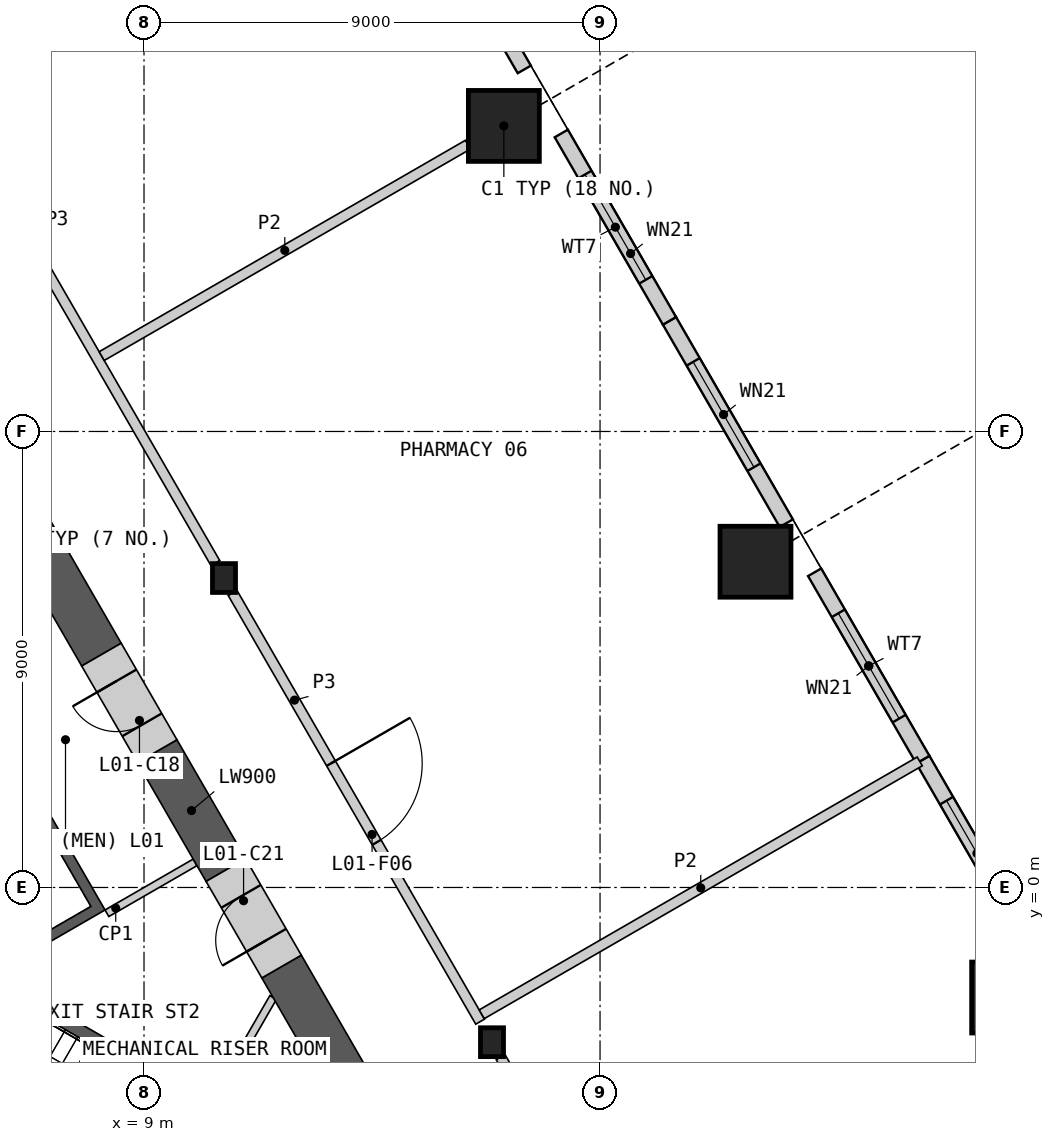
"""IFC4 building model, lengths in metres.
Left out: names, types, materials, properties, quantities, classifications, styles, units other than length and angle.
Written with IfcOpenShell. Run it as: python <this file> out.ifc"""

import sys

from ifc_helpers import new_model, si_unit, direction, frame, frame_2d, origin, origin_2d, place, context, subcontext, project, spatial, polyline, rectangle, hollow_rectangle, i_section, outline, extrude, element, fill, save


model = new_model("IFC4")
c1 = context("Model", 3, precision=1e-05, world=origin(), true_north=direction((0.0, 1.0)))
c2 = subcontext(c1, "Body", "Model", "MODEL_VIEW")
j1 = project(units=[si_unit("LENGTHUNIT", "METRE"), si_unit("PLANEANGLEUNIT", "RADIAN")], contexts=[c1])
p1 = place(None, origin())
s1 = spatial("IfcSite", under=j1, at=p1, CompositionType="ELEMENT")
p2 = place(p1, origin())
s2 = spatial("IfcBuilding", under=s1, at=p2, CompositionType="ELEMENT")
p3 = place(p2, frame((0.0, 0.0, 10.0)))
s3 = spatial("IfcBuildingStorey", under=s2, at=p3, CompositionType="ELEMENT", Elevation=10.0)
for number, where, z_axis, x_axis in (
    (1, (26.034, -2.172, 0.0), (0.0, 0.0, 1.0), (1.0, 0.0, 0.0)),
    (2, (21.068, 6.429, 0.0), (0.0, 0.0, 1.0), (1.0, 0.0, 0.0)),
    (3, (16.102, 15.031, 0.0), (0.0, 0.0, 1.0), (1.0, 0.0, 0.0)),
):
    element("IfcColumn", number, at=place(p3, frame(where, z_axis=z_axis, x_axis=x_axis)), inside=s3, PredefinedType="COLUMN", context=c2, shape_type="SweptSolid", body=[
        extrude(hollow_rectangle(XDim=1.4, YDim=1.4, WallThickness=0.1, at=origin_2d()), origin(), (0.0, 0.0, 1.0), 5.5),
    ])
for number, where, z_axis, x_axis in (
    (4, (15.868, -3.054, 0.0), (0.0, 0.0, 1.0), (1.0, 0.0, 0.0)),
    (5, (10.578, 6.107, 0.0), (0.0, 0.0, 1.0), (1.0, 0.0, 0.0)),
):
    element("IfcColumn", number, at=place(p3, frame(where, z_axis=z_axis, x_axis=x_axis)), inside=s3, PredefinedType="COLUMN", context=c2, shape_type="SweptSolid", body=[
        extrude(i_section(OverallWidth=0.454, OverallDepth=0.57, WebThickness=0.078, FlangeThickness=0.125, at=origin_2d()), origin(), (0.0, 0.0, 1.0), 5.5),
    ])
p4 = place(p3, frame((26.642, -1.412, 0.0), z_axis=(0.0, 0.0, 1.0), x_axis=(-0.499964285679, 0.866046022475, 0.0)))
e6 = element("IfcWall", 6, at=p4, inside=s3, PredefinedType="SOLIDWALL", context=c2, shape_type="SweptSolid", body=[
    extrude(rectangle(XDim=4.544, YDim=0.3, at=frame_2d((2.272, 0.0))), origin(), (0.0, 0.0, 1.0), 5.05),
])
p5 = place(p4, frame((1.209, 0.0, 0.9)))
e7 = element("IfcOpeningElement", 7, at=p5, cuts=e6, PredefinedType="OPENING", context=c2, shape_type="SweptSolid", body=[
    extrude(rectangle(XDim=2.4, YDim=3.0, at=frame_2d((1.2, 1.5))), frame((0.0, 0.16, 0.0), z_axis=(0.0, -1.0, 0.0), x_axis=(1.0, 0.0, 0.0)), (0.0, 0.0, 1.0), 0.32),
])
p6 = place(p3, frame((24.37, 2.523, 0.0), z_axis=(0.0, 0.0, 1.0), x_axis=(-0.500019418418, 0.866014192265, 0.0)))
e8 = element("IfcWall", 8, at=p6, inside=s3, PredefinedType="SOLIDWALL", context=c2, shape_type="SweptSolid", body=[
    extrude(rectangle(XDim=4.27, YDim=0.3, at=frame_2d((2.135, 0.0))), origin(), (0.0, 0.0, 1.0), 5.05),
])
p7 = place(p6, frame((0.935, 0.0, 0.9)))
e9 = element("IfcOpeningElement", 9, at=p7, cuts=e8, PredefinedType="OPENING", context=c2, shape_type="SweptSolid", body=[
    extrude(rectangle(XDim=2.4, YDim=3.0, at=frame_2d((1.2, 1.5))), frame((0.0, 0.16, 0.0), z_axis=(0.0, -1.0, 0.0), x_axis=(1.0, 0.0, 0.0)), (0.0, 0.0, 1.0), 0.32),
])
p8 = place(p3, frame((21.676, 7.189, 0.0), z_axis=(0.0, 0.0, 1.0), x_axis=(-0.499982117899, 0.866035727774, 0.0)))
e10 = element("IfcWall", 10, at=p8, inside=s3, PredefinedType="SOLIDWALL", context=c2, shape_type="SweptSolid", body=[
    extrude(rectangle(XDim=4.612, YDim=0.3, at=frame_2d((2.306, 0.0))), origin(), (0.0, 0.0, 1.0), 5.05),
])
p9 = place(p8, frame((1.277, 0.0, 0.9)))
e11 = element("IfcOpeningElement", 11, at=p9, cuts=e10, PredefinedType="OPENING", context=c2, shape_type="SweptSolid", body=[
    extrude(rectangle(XDim=2.4, YDim=3.0, at=frame_2d((1.2, 1.5))), frame((0.0, 0.16, 0.0), z_axis=(0.0, -1.0, 0.0), x_axis=(1.0, 0.0, 0.0)), (0.0, 0.0, 1.0), 0.32),
])
p10 = place(p3, frame((19.37, 11.183, 0.0), z_axis=(0.0, 0.0, 1.0), x_axis=(-0.499994660107, 0.866028486751, 0.0)))
e12 = element("IfcWall", 12, at=p10, inside=s3, PredefinedType="SOLIDWALL", context=c2, shape_type="SweptSolid", body=[
    extrude(rectangle(XDim=4.27, YDim=0.3, at=frame_2d((2.135, 0.0))), origin(), (0.0, 0.0, 1.0), 5.05),
])
p11 = place(p10, frame((0.935, 0.0, 0.9)))
e13 = element("IfcOpeningElement", 13, at=p11, cuts=e12, PredefinedType="OPENING", context=c2, shape_type="SweptSolid", body=[
    extrude(rectangle(XDim=2.4, YDim=3.0, at=frame_2d((1.2, 1.5))), frame((0.0, 0.16, 0.0), z_axis=(0.0, -1.0, 0.0), x_axis=(1.0, 0.0, 0.0)), (0.0, 0.0, 1.0), 0.32),
])
p12 = place(p3, frame((16.505, 16.146, 0.0), z_axis=(0.0, 0.0, 1.0), x_axis=(-0.500019418418, 0.866014192265, 0.0)))
e14 = element("IfcWall", 14, at=p12, inside=s3, PredefinedType="SOLIDWALL", context=c2, shape_type="SweptSolid", body=[
    extrude(rectangle(XDim=4.27, YDim=0.3, at=frame_2d((2.135, 0.0))), origin(), (0.0, 0.0, 1.0), 5.05),
])
p13 = place(p12, frame((0.935, 0.0, 0.9)))
e15 = element("IfcOpeningElement", 15, at=p13, cuts=e14, PredefinedType="OPENING", context=c2, shape_type="SweptSolid", body=[
    extrude(rectangle(XDim=2.4, YDim=3.0, at=frame_2d((1.2, 1.5))), frame((0.0, 0.16, 0.0), z_axis=(0.0, -1.0, 0.0), x_axis=(1.0, 0.0, 0.0)), (0.0, 0.0, 1.0), 0.32),
])
p14 = place(p3, origin())
e16 = element("IfcWall", 16, at=p14, inside=s3, PredefinedType="SHEAR", context=c2, shape_type="SweptSolid", body=[
    extrude(outline(polyline([(2.66, 4.192), (4.831, 5.445), (8.231, -0.444), (6.061, -1.697), (5.96, -1.524), (7.952, -0.374), (6.952, 1.358), (4.96, 0.208), (4.861, 0.381), (6.852, 1.531), (5.852, 3.263), (3.861, 2.113), (3.76, 2.287), (5.752, 3.437), (4.752, 5.169), (2.76, 4.019), (2.66, 4.192)])), origin(), (0.0, 0.0, 1.0), 5.05),
])
p15 = place(p3, origin())
e17 = element("IfcWall", 17, at=p15, inside=s3, PredefinedType="SHEAR", context=c2, shape_type="SweptSolid", body=[
    extrude(outline(polyline([(10.032, -4.298), (10.374, -4.206), (5.307, -1.281), (5.182, -1.498), (10.032, -4.298)])), origin(), (0.0, 0.0, 1.0), 5.05),
])
p16 = place(p3, frame((8.268, -0.509, 0.0), z_axis=(0.0, 0.0, 1.0), x_axis=(0.866035824272, 0.499981950752, 0.0)))
e18 = element("IfcWall", 18, at=p16, inside=s3, PredefinedType="PARTITIONING", context=c2, shape_type="SweptSolid", body=[
    extrude(rectangle(XDim=2.009, YDim=0.15, at=frame_2d((1.004, 0.0))), origin(), (0.0, 0.0, 1.0), 5.05),
])
p17 = place(p3, frame((10.374, -4.206, 0.0), z_axis=(0.0, 0.0, 1.0), x_axis=(0.499995339376, 0.86602809458, 0.0)))
e19 = element("IfcWall", 19, at=p17, inside=s3, PredefinedType="PARTITIONING", context=c2, shape_type="SweptSolid", body=[
    extrude(rectangle(XDim=2.349, YDim=0.15, at=frame_2d((1.175, 0.0))), origin(), (0.0, 0.0, 1.0), 5.05),
])
p18 = place(p3, frame((8.16, 4.596, 0.0), z_axis=(0.0, 0.0, 1.0), x_axis=(-0.500009830349, 0.866019728156, 0.0)))
e20 = element("IfcWall", 20, at=p18, inside=s3, PredefinedType="SHEAR", context=c2, shape_type="SweptSolid", body=[
    extrude(rectangle(XDim=15.541, YDim=0.9, at=frame_2d((7.771, 0.0))), origin(), (0.0, 0.0, 1.0), 5.05),
])
p19 = place(p3, frame((15.831, -8.69, 0.0), z_axis=(0.0, 0.0, 1.0), x_axis=(-0.499995435471, 0.8660280391, 0.0)))
e21 = element("IfcWall", 21, at=p19, inside=s3, PredefinedType="SHEAR", context=c2, shape_type="SweptSolid", body=[
    extrude(rectangle(XDim=8.232, YDim=0.9, at=frame_2d((4.116, 0.0))), origin(), (0.0, 0.0, 1.0), 5.05),
])
p20 = place(p3, frame((10.615, 0.344, 0.0), z_axis=(0.0, 0.0, 1.0), x_axis=(-0.500044870432, 0.865999496279, 0.0)))
e22 = element("IfcWall", 22, at=p20, inside=s3, PredefinedType="SHEAR", context=c2, shape_type="SweptSolid", body=[
    extrude(rectangle(XDim=2.709, YDim=0.9, at=frame_2d((1.354, 0.0))), origin(), (0.0, 0.0, 1.0), 5.05),
])
p21 = place(p3, frame((9.26, 2.691, 0.0), z_axis=(0.0, 0.0, 1.0), x_axis=(-0.499946605688, 0.86605622881, 0.0)))
e23 = element("IfcWall", 23, at=p21, inside=s3, PredefinedType="SHEAR", context=c2, shape_type="SweptSolid", body=[
    extrude(rectangle(XDim=2.2, YDim=0.9, at=frame_2d((1.1, 0.0))), origin(), (0.0, 0.0, 1.0), 5.05),
])
p22 = place(p21, frame((0.6, 0.0, 0.0)))
e24 = element("IfcOpeningElement", 24, at=p22, cuts=e23, PredefinedType="OPENING", context=c2, shape_type="SweptSolid", body=[
    extrude(rectangle(XDim=1.0, YDim=2.1, at=frame_2d((0.5, 1.05))), frame((0.0, 0.46, 0.0), z_axis=(0.0, -1.0, 0.0), x_axis=(1.0, 0.0, 0.0)), (0.0, 0.0, 1.0), 0.92),
])
p23 = place(p3, frame((11.715, -1.561, 0.0), z_axis=(0.0, 0.0, 1.0), x_axis=(-0.499946605688, 0.86605622881, 0.0)))
e25 = element("IfcWall", 25, at=p23, inside=s3, PredefinedType="SHEAR", context=c2, shape_type="SweptSolid", body=[
    extrude(rectangle(XDim=2.2, YDim=0.9, at=frame_2d((1.1, 0.0))), origin(), (0.0, 0.0, 1.0), 5.05),
])
p24 = place(p23, frame((0.6, 0.0, 0.0)))
e26 = element("IfcOpeningElement", 26, at=p24, cuts=e25, PredefinedType="OPENING", context=c2, shape_type="SweptSolid", body=[
    extrude(rectangle(XDim=1.0, YDim=2.1, at=frame_2d((0.5, 1.05))), frame((0.0, 0.46, 0.0), z_axis=(0.0, -1.0, 0.0), x_axis=(1.0, 0.0, 0.0)), (0.0, 0.0, 1.0), 0.92),
])
p25 = place(p3, frame((5.459, 14.974, 0.0), z_axis=(0.0, 0.0, 1.0), x_axis=(0.499985793049, -0.866033606016, 0.0)))
e27 = element("IfcWall", 27, at=p25, inside=s3, PredefinedType="PARTITIONING", context=c2, shape_type="SweptSolid", body=[
    extrude(rectangle(XDim=9.898, YDim=0.2, at=frame_2d((4.949, 0.0))), origin(), (0.0, 0.0, 1.0), 5.05),
])
p26 = place(p3, frame((10.749, 5.813, 0.0), z_axis=(0.0, 0.0, 1.0), x_axis=(0.500017363087, -0.866015378969, 0.0)))
e28 = element("IfcWall", 28, at=p26, inside=s3, PredefinedType="PARTITIONING", context=c2, shape_type="SweptSolid", body=[
    extrude(rectangle(XDim=9.77, YDim=0.2, at=frame_2d((4.885, 0.0))), origin(), (0.0, 0.0, 1.0), 5.05),
])
p27 = place(p26, frame((3.884, 0.0, 0.0)))
e29 = element("IfcOpeningElement", 29, at=p27, cuts=e28, PredefinedType="OPENING", context=c2, shape_type="SweptSolid", body=[
    extrude(rectangle(XDim=1.8, YDim=2.1, at=frame_2d((0.9, 1.05))), frame((0.0, 0.11, 0.0), z_axis=(0.0, -1.0, 0.0), x_axis=(1.0, 0.0, 0.0)), (0.0, 0.0, 1.0), 0.22),
])
p28 = place(p3, frame((16.038, -3.348, 0.0), z_axis=(0.0, 0.0, 1.0), x_axis=(0.499988314375, -0.866032150378, 0.0)))
e30 = element("IfcWall", 30, at=p28, inside=s3, PredefinedType="PARTITIONING", context=c2, shape_type="SweptSolid", body=[
    extrude(rectangle(XDim=6.412, YDim=0.2, at=frame_2d((3.206, 0.0))), origin(), (0.0, 0.0, 1.0), 5.05),
])
p29 = place(p28, frame((2.656, 0.0, 0.0)))
e31 = element("IfcOpeningElement", 31, at=p29, cuts=e30, PredefinedType="OPENING", context=c2, shape_type="SweptSolid", body=[
    extrude(rectangle(XDim=1.0, YDim=2.1, at=frame_2d((0.5, 1.05))), frame((0.0, 0.11, 0.0), z_axis=(0.0, -1.0, 0.0), x_axis=(1.0, 0.0, 0.0)), (0.0, 0.0, 1.0), 0.22),
])
p30 = place(p3, frame((15.665, -2.503, 0.0), z_axis=(0.0, 0.0, 1.0), x_axis=(0.866034070548, 0.499984988425, 0.0)))
e32 = element("IfcWall", 32, at=p30, inside=s3, PredefinedType="PARTITIONING", context=c2, shape_type="SweptSolid", body=[
    extrude(rectangle(XDim=9.982, YDim=0.2, at=frame_2d((4.991, 0.0))), origin(), (0.0, 0.0, 1.0), 5.05),
])
p31 = place(p3, frame((8.165, 10.488, 0.0), z_axis=(0.0, 0.0, 1.0), x_axis=(0.866027244746, 0.499996811348, 0.0)))
e33 = element("IfcWall", 33, at=p31, inside=s3, PredefinedType="PARTITIONING", context=c2, shape_type="SweptSolid", body=[
    extrude(rectangle(XDim=8.345, YDim=0.2, at=frame_2d((4.172, 0.0))), origin(), (0.0, 0.0, 1.0), 5.05),
])
p32 = place(p5, origin())
e34 = element("IfcWindow", 34, at=p32, inside=s3, PartitioningType="SINGLE_PANEL", PredefinedType="WINDOW", context=c2, shape_type="SweptSolid", body=[
    extrude(rectangle(XDim=2.4, YDim=3.0, at=frame_2d((1.2, 1.5))), frame((0.0, 0.03, 0.0), z_axis=(0.0, -1.0, 0.0), x_axis=(1.0, 0.0, 0.0)), (0.0, 0.0, 1.0), 0.06),
])
fill(e7, e34)
p33 = place(p7, origin())
e35 = element("IfcWindow", 35, at=p33, inside=s3, PartitioningType="SINGLE_PANEL", PredefinedType="WINDOW", context=c2, shape_type="SweptSolid", body=[
    extrude(rectangle(XDim=2.4, YDim=3.0, at=frame_2d((1.2, 1.5))), frame((0.0, 0.03, 0.0), z_axis=(0.0, -1.0, 0.0), x_axis=(1.0, 0.0, 0.0)), (0.0, 0.0, 1.0), 0.06),
])
fill(e9, e35)
p34 = place(p9, origin())
e36 = element("IfcWindow", 36, at=p34, inside=s3, PartitioningType="SINGLE_PANEL", PredefinedType="WINDOW", context=c2, shape_type="SweptSolid", body=[
    extrude(rectangle(XDim=2.4, YDim=3.0, at=frame_2d((1.2, 1.5))), frame((0.0, 0.03, 0.0), z_axis=(0.0, -1.0, 0.0), x_axis=(1.0, 0.0, 0.0)), (0.0, 0.0, 1.0), 0.06),
])
fill(e11, e36)
p35 = place(p11, origin())
e37 = element("IfcWindow", 37, at=p35, inside=s3, PartitioningType="SINGLE_PANEL", PredefinedType="WINDOW", context=c2, shape_type="SweptSolid", body=[
    extrude(rectangle(XDim=2.4, YDim=3.0, at=frame_2d((1.2, 1.5))), frame((0.0, 0.03, 0.0), z_axis=(0.0, -1.0, 0.0), x_axis=(1.0, 0.0, 0.0)), (0.0, 0.0, 1.0), 0.06),
])
fill(e13, e37)
p36 = place(p22, origin())
e38 = element("IfcDoor", 38, at=p36, inside=s3, OperationType="SINGLE_SWING_RIGHT", PredefinedType="DOOR", context=c2, shape_type="SweptSolid", body=[
    extrude(rectangle(XDim=1.0, YDim=2.1, at=frame_2d((0.5, 1.05))), frame((0.0, 0.205, 0.0), z_axis=(0.0, -1.0, 0.0), x_axis=(1.0, 0.0, 0.0)), (0.0, 0.0, 1.0), 0.05),
])
fill(e24, e38)
p37 = place(p24, origin())
e39 = element("IfcDoor", 39, at=p37, inside=s3, OperationType="SINGLE_SWING_LEFT", PredefinedType="DOOR", context=c2, shape_type="SweptSolid", body=[
    extrude(rectangle(XDim=1.0, YDim=2.1, at=frame_2d((0.5, 1.05))), frame((0.0, 0.205, 0.0), z_axis=(0.0, -1.0, 0.0), x_axis=(1.0, 0.0, 0.0)), (0.0, 0.0, 1.0), 0.05),
])
fill(e26, e39)
p38 = place(p27, origin())
e40 = element("IfcDoor", 40, at=p38, inside=s3, OperationType="DOUBLE_DOOR_SINGLE_SWING", PredefinedType="DOOR", context=c2, shape_type="SweptSolid", body=[
    extrude(rectangle(XDim=1.8, YDim=2.1, at=frame_2d((0.9, 1.05))), frame((0.0, 0.025, 0.0), z_axis=(0.0, -1.0, 0.0), x_axis=(1.0, 0.0, 0.0)), (0.0, 0.0, 1.0), 0.05),
])
fill(e29, e40)
save(model, sys.argv[1])
